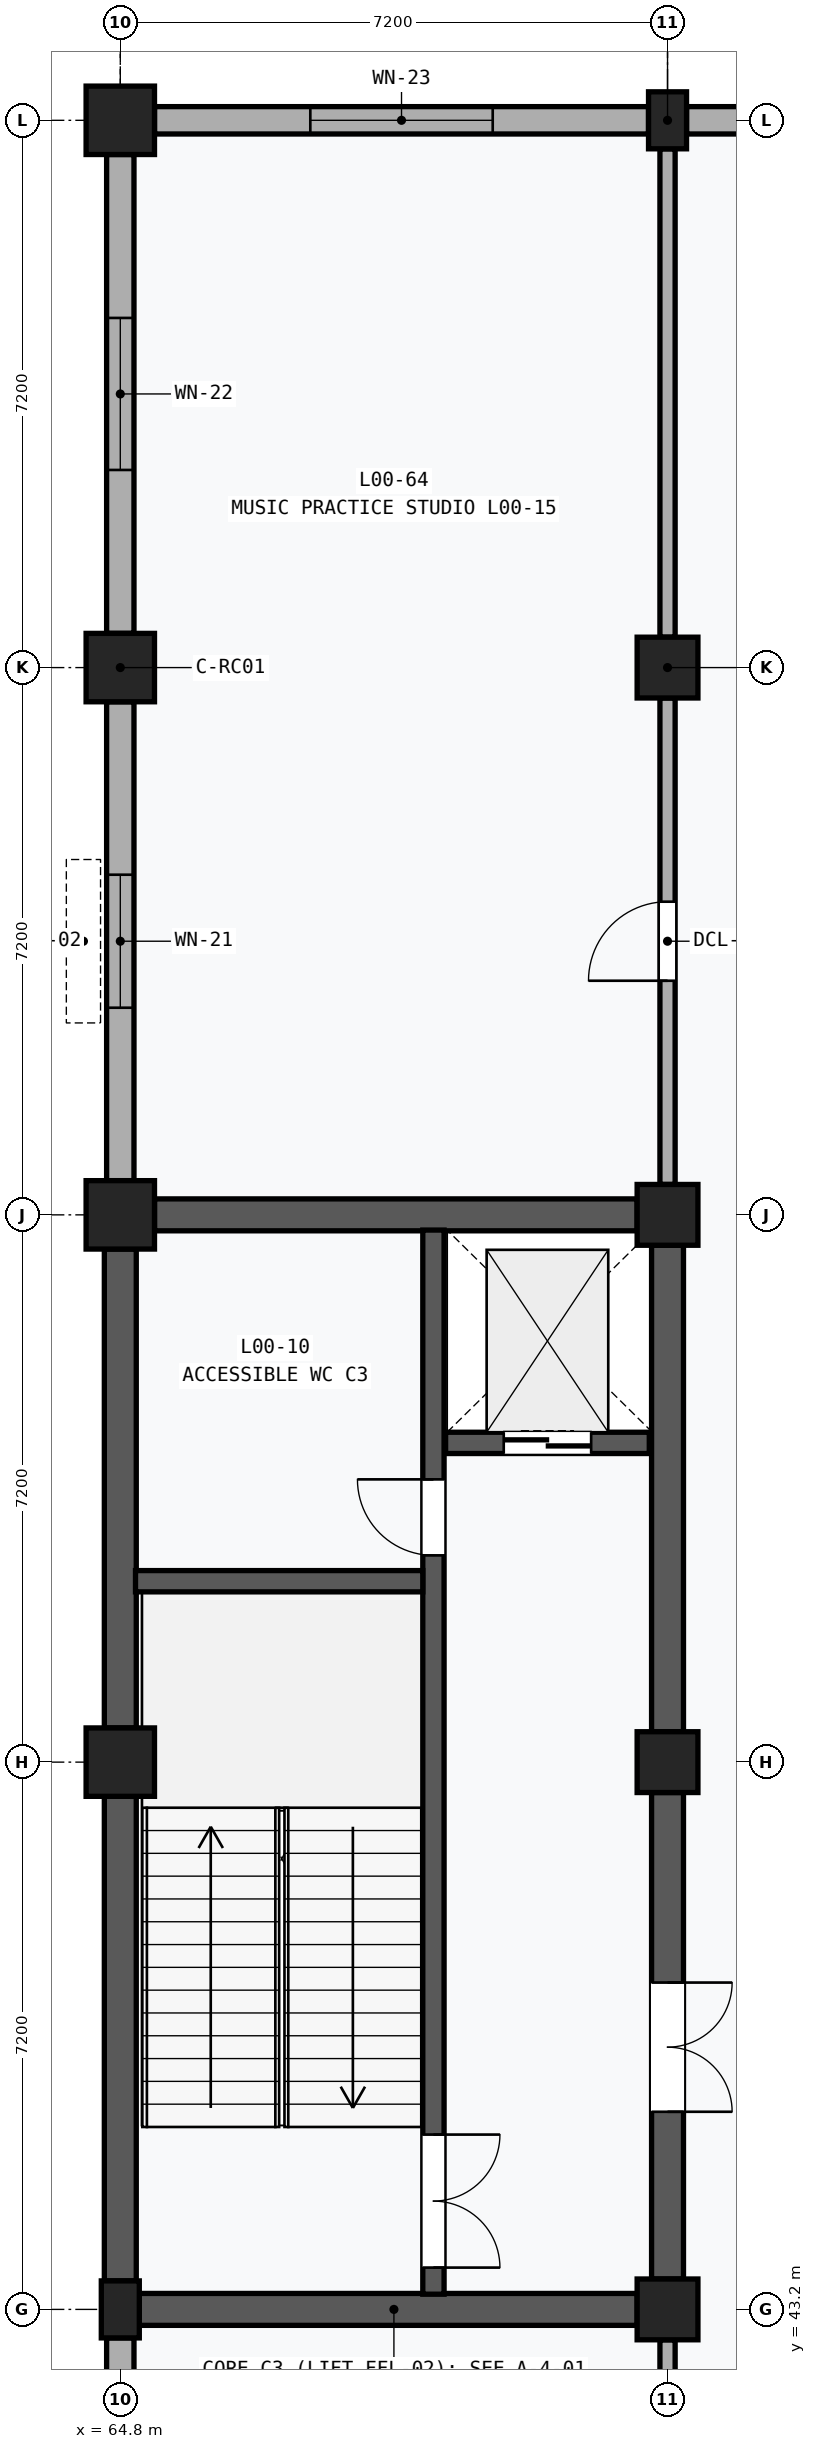
"""IFC4 building model, lengths in metres.
Left out: names, types, materials, properties, quantities, classifications, styles, units other than length and angle.
Written with IfcOpenShell. Run it as: python <this file> out.ifc"""

import sys

from ifc_helpers import new_model, si_unit, direction, frame, frame_2d, origin, origin_2d, place, context, subcontext, project, spatial, rectangle, extrude, element, fill, save


model = new_model("IFC4")
c1 = context("Model", 3, precision=1e-05, world=origin(), true_north=direction((0.0, 1.0)))
c2 = subcontext(c1, "Body", "Model", "MODEL_VIEW")
j1 = project(units=[si_unit("LENGTHUNIT", "METRE"), si_unit("PLANEANGLEUNIT", "RADIAN")], contexts=[c1])
p1 = place(None, origin())
s1 = spatial("IfcSite", under=j1, at=p1, CompositionType="ELEMENT")
p2 = place(p1, origin())
s2 = spatial("IfcBuilding", under=s1, at=p2, CompositionType="ELEMENT")
p3 = place(p2, origin())
s3 = spatial("IfcBuildingStorey", under=s2, at=p3, CompositionType="ELEMENT", Elevation=0.0)
p4 = place(p3, frame((64.8, 43.2, 0.0), z_axis=(0.0, 0.0, 1.0), x_axis=(1.0, 0.0, 0.0)))
e1 = element("IfcColumn", 1, at=p4, inside=s3, PredefinedType="PILASTER", context=c2, shape_type="SweptSolid", body=[
    extrude(rectangle(XDim=0.5, YDim=0.75, at=origin_2d()), origin(), (0.0, 0.0, 1.0), 4.8),
])
for number, where, z_axis, x_axis in (
    (2, (64.8, 50.4, 0.0), (0.0, 0.0, 1.0), (1.0, 0.0, 0.0)),
    (3, (64.8, 57.6, 0.0), (0.0, 0.0, 1.0), (1.0, 0.0, 0.0)),
    (4, (64.8, 64.8, 0.0), (0.0, 0.0, 1.0), (1.0, 0.0, 0.0)),
    (5, (64.8, 72.0, 0.0), (0.0, 0.0, 1.0), (1.0, 0.0, 0.0)),
):
    element("IfcColumn", number, at=place(p3, frame(where, z_axis=z_axis, x_axis=x_axis)), inside=s3, PredefinedType="COLUMN", context=c2, shape_type="SweptSolid", body=[
        extrude(rectangle(XDim=0.9, YDim=0.9, at=origin_2d()), origin(), (0.0, 0.0, 1.0), 4.8),
    ])
for number, where, z_axis, x_axis in (
    (6, (72.0, 43.2, 0.0), (0.0, 0.0, 1.0), (1.0, 0.0, 0.0)),
    (7, (72.0, 50.4, 0.0), (0.0, 0.0, 1.0), (1.0, 0.0, 0.0)),
    (8, (72.0, 57.6, 0.0), (0.0, 0.0, 1.0), (1.0, 0.0, 0.0)),
    (9, (72.0, 64.8, 0.0), (0.0, 0.0, 1.0), (1.0, 0.0, 0.0)),
):
    element("IfcColumn", number, at=place(p3, frame(where, z_axis=z_axis, x_axis=x_axis)), inside=s3, PredefinedType="COLUMN", context=c2, shape_type="SweptSolid", body=[
        extrude(rectangle(XDim=0.8, YDim=0.8, at=origin_2d()), origin(), (0.0, 0.0, 1.0), 4.8),
    ])
p5 = place(p3, frame((72.0, 72.0, 0.0), z_axis=(0.0, 0.0, 1.0), x_axis=(1.0, 0.0, 0.0)))
e10 = element("IfcColumn", 10, at=p5, inside=s3, PredefinedType="PILASTER", context=c2, shape_type="SweptSolid", body=[
    extrude(rectangle(XDim=0.5, YDim=0.75, at=origin_2d()), origin(), (0.0, 0.0, 1.0), 4.8),
])
p6 = place(p3, frame((64.8, 36.45, 0.0), z_axis=(0.0, 0.0, 1.0), x_axis=(0.0, 1.0, 0.0)))
e11 = element("IfcWall", 11, at=p6, inside=s3, PredefinedType="SOLIDWALL", context=c2, shape_type="SweptSolid", body=[
    extrude(rectangle(XDim=6.375, YDim=0.36, at=frame_2d((3.188, 0.0))), origin(), (0.0, 0.0, 1.0), 3.89),
])
p7 = place(p6, frame((2.087, 0.0, 1.1)))
e12 = element("IfcOpeningElement", 12, at=p7, cuts=e11, PredefinedType="OPENING", context=c2, shape_type="SweptSolid", body=[
    extrude(rectangle(XDim=2.2, YDim=1.5, at=frame_2d((1.1, 0.75))), frame((0.0, 0.192, 0.0), z_axis=(0.0, -1.0, 0.0), x_axis=(1.0, 0.0, 0.0)), (0.0, 0.0, 1.0), 0.384),
])
p8 = place(p3, frame((64.8, 58.05, 0.0), z_axis=(0.0, 0.0, 1.0), x_axis=(0.0, 1.0, 0.0)))
e13 = element("IfcWall", 13, at=p8, inside=s3, PredefinedType="SOLIDWALL", context=c2, shape_type="SweptSolid", body=[
    extrude(rectangle(XDim=6.3, YDim=0.36, at=frame_2d((3.15, 0.0))), origin(), (0.0, 0.0, 1.0), 3.89),
])
p9 = place(p8, frame((2.275, 0.0, 1.2)))
e14 = element("IfcOpeningElement", 14, at=p9, cuts=e13, PredefinedType="OPENING", context=c2, shape_type="SweptSolid", body=[
    extrude(rectangle(XDim=1.75, YDim=1.35, at=frame_2d((0.875, 0.675))), frame((0.0, 0.192, 0.0), z_axis=(0.0, -1.0, 0.0), x_axis=(1.0, 0.0, 0.0)), (0.0, 0.0, 1.0), 0.384),
])
p10 = place(p3, frame((65.25, 72.0, 0.0), z_axis=(0.0, 0.0, 1.0), x_axis=(1.0, 0.0, 0.0)))
e15 = element("IfcWall", 15, at=p10, inside=s3, PredefinedType="SOLIDWALL", context=c2, shape_type="SweptSolid", body=[
    extrude(rectangle(XDim=6.5, YDim=0.36, at=frame_2d((3.25, 0.0))), origin(), (0.0, 0.0, 1.0), 3.89),
])
p11 = place(p10, frame((2.05, 0.0, 0.7)))
e16 = element("IfcOpeningElement", 16, at=p11, cuts=e15, PredefinedType="OPENING", context=c2, shape_type="SweptSolid", body=[
    extrude(rectangle(XDim=2.4, YDim=2.2, at=frame_2d((1.2, 1.1))), frame((0.0, 0.192, 0.0), z_axis=(0.0, -1.0, 0.0), x_axis=(1.0, 0.0, 0.0)), (0.0, 0.0, 1.0), 0.384),
])
p12 = place(p3, frame((64.8, 65.25, 0.0), z_axis=(0.0, 0.0, 1.0), x_axis=(0.0, 1.0, 0.0)))
e17 = element("IfcWall", 17, at=p12, inside=s3, PredefinedType="SOLIDWALL", context=c2, shape_type="SweptSolid", body=[
    extrude(rectangle(XDim=6.3, YDim=0.36, at=frame_2d((3.15, 0.0))), origin(), (0.0, 0.0, 1.0), 3.89),
])
p13 = place(p12, frame((2.15, 0.0, 0.7)))
e18 = element("IfcOpeningElement", 18, at=p13, cuts=e17, PredefinedType="OPENING", context=c2, shape_type="SweptSolid", body=[
    extrude(rectangle(XDim=2.0, YDim=2.2, at=frame_2d((1.0, 1.1))), frame((0.0, 0.192, 0.0), z_axis=(0.0, -1.0, 0.0), x_axis=(1.0, 0.0, 0.0)), (0.0, 0.0, 1.0), 0.384),
])
p14 = place(p3, frame((72.25, 72.0, 0.0), z_axis=(0.0, 0.0, 1.0), x_axis=(1.0, 0.0, 0.0)))
e19 = element("IfcWall", 19, at=p14, inside=s3, PredefinedType="SOLIDWALL", context=c2, shape_type="SweptSolid", body=[
    extrude(rectangle(XDim=6.55, YDim=0.36, at=frame_2d((3.275, 0.0))), origin(), (0.0, 0.0, 1.0), 3.89),
])
p15 = place(p14, frame((1.875, 0.0, 0.7)))
e20 = element("IfcOpeningElement", 20, at=p15, cuts=e19, PredefinedType="OPENING", context=c2, shape_type="SweptSolid", body=[
    extrude(rectangle(XDim=2.8, YDim=2.2, at=frame_2d((1.4, 1.1))), frame((0.0, 0.192, 0.0), z_axis=(0.0, -1.0, 0.0), x_axis=(1.0, 0.0, 0.0)), (0.0, 0.0, 1.0), 0.384),
])
p16 = place(p3, frame((64.8, 43.575, 0.0), z_axis=(0.0, 0.0, 1.0), x_axis=(0.0, 1.0, 0.0)))
e21 = element("IfcWall", 21, at=p16, inside=s3, PredefinedType="SHEAR", context=c2, shape_type="SweptSolid", body=[
    extrude(rectangle(XDim=6.375, YDim=0.42, at=frame_2d((3.188, 0.0))), origin(), (0.0, 0.0, 1.0), 3.89),
])
p17 = place(p3, frame((64.8, 50.85, 0.0), z_axis=(0.0, 0.0, 1.0), x_axis=(0.0, 1.0, 0.0)))
e22 = element("IfcWall", 22, at=p17, inside=s3, PredefinedType="SHEAR", context=c2, shape_type="SweptSolid", body=[
    extrude(rectangle(XDim=6.3, YDim=0.42, at=frame_2d((3.15, 0.0))), origin(), (0.0, 0.0, 1.0), 3.89),
])
p18 = place(p3, frame((72.0, 43.6, 0.0), z_axis=(0.0, 0.0, 1.0), x_axis=(0.0, 1.0, 0.0)))
e23 = element("IfcWall", 23, at=p18, inside=s3, PredefinedType="SHEAR", context=c2, shape_type="SweptSolid", body=[
    extrude(rectangle(XDim=6.4, YDim=0.42, at=frame_2d((3.2, 0.0))), origin(), (0.0, 0.0, 1.0), 3.62),
])
p19 = place(p18, frame((2.2, 0.0, 0.0)))
e24 = element("IfcOpeningElement", 24, at=p19, cuts=e23, PredefinedType="OPENING", context=c2, shape_type="SweptSolid", body=[
    extrude(rectangle(XDim=1.7, YDim=2.25, at=frame_2d((0.85, 1.125))), frame((0.0, 0.222, 0.0), z_axis=(0.0, -1.0, 0.0), x_axis=(1.0, 0.0, 0.0)), (0.0, 0.0, 1.0), 0.444),
])
p20 = place(p3, frame((72.0, 50.8, 0.0), z_axis=(0.0, 0.0, 1.0), x_axis=(0.0, 1.0, 0.0)))
e25 = element("IfcWall", 25, at=p20, inside=s3, PredefinedType="SHEAR", context=c2, shape_type="SweptSolid", body=[
    extrude(rectangle(XDim=6.4, YDim=0.42, at=frame_2d((3.2, 0.0))), origin(), (0.0, 0.0, 1.0), 3.62),
])
p21 = place(p3, frame((65.05, 43.2, 0.0), z_axis=(0.0, 0.0, 1.0), x_axis=(1.0, 0.0, 0.0)))
e26 = element("IfcWall", 26, at=p21, inside=s3, PredefinedType="SHEAR", context=c2, shape_type="SweptSolid", body=[
    extrude(rectangle(XDim=6.55, YDim=0.42, at=frame_2d((3.275, 0.0))), origin(), (0.0, 0.0, 1.0), 3.62),
])
p22 = place(p3, frame((65.25, 57.6, 0.0), z_axis=(0.0, 0.0, 1.0), x_axis=(1.0, 0.0, 0.0)))
e27 = element("IfcWall", 27, at=p22, inside=s3, PredefinedType="SHEAR", context=c2, shape_type="SweptSolid", body=[
    extrude(rectangle(XDim=6.35, YDim=0.42, at=frame_2d((3.175, 0.0))), origin(), (0.0, 0.0, 1.0), 3.62),
])
p23 = place(p3, frame((68.92, 43.4, 0.0), z_axis=(0.0, 0.0, 1.0), x_axis=(0.0, 1.0, 0.0)))
e28 = element("IfcWall", 28, at=p23, inside=s3, PredefinedType="SHEAR", context=c2, shape_type="SweptSolid", body=[
    extrude(rectangle(XDim=14.0, YDim=0.28, at=frame_2d((7.0, 0.0))), origin(), (0.0, 0.0, 1.0), 4.52),
])
p24 = place(p23, frame((0.35, 0.0, 0.0)))
e29 = element("IfcOpeningElement", 29, at=p24, cuts=e28, PredefinedType="OPENING", context=c2, shape_type="SweptSolid", body=[
    extrude(rectangle(XDim=1.75, YDim=2.15, at=frame_2d((0.875, 1.075))), frame((0.0, 0.152, 0.0), z_axis=(0.0, -1.0, 0.0), x_axis=(1.0, 0.0, 0.0)), (0.0, 0.0, 1.0), 0.304),
])
p25 = place(p23, frame((9.72, 0.0, 0.0)))
e30 = element("IfcOpeningElement", 30, at=p25, cuts=e28, PredefinedType="OPENING", context=c2, shape_type="SweptSolid", body=[
    extrude(rectangle(XDim=1.0, YDim=2.15, at=frame_2d((0.5, 1.075))), frame((0.0, 0.152, 0.0), z_axis=(0.0, -1.0, 0.0), x_axis=(1.0, 0.0, 0.0)), (0.0, 0.0, 1.0), 0.304),
])
p26 = place(p3, frame((65.0, 52.78, 0.0), z_axis=(0.0, 0.0, 1.0), x_axis=(1.0, 0.0, 0.0)))
e31 = element("IfcWall", 31, at=p26, inside=s3, PredefinedType="SHEAR", context=c2, shape_type="SweptSolid", body=[
    extrude(rectangle(XDim=3.78, YDim=0.28, at=frame_2d((1.89, 0.0))), origin(), (0.0, 0.0, 1.0), 4.52),
])
p27 = place(p3, frame((69.08, 54.6, 0.0), z_axis=(0.0, 0.0, 1.0), x_axis=(1.0, 0.0, 0.0)))
e32 = element("IfcWall", 32, at=p27, inside=s3, PredefinedType="SHEAR", context=c2, shape_type="SweptSolid", body=[
    extrude(rectangle(XDim=2.68, YDim=0.28, at=frame_2d((1.34, 0.0))), origin(), (0.0, 0.0, 1.0), 4.52),
])
p28 = place(p27, frame((0.765, 0.0, 0.0)))
e33 = element("IfcOpeningElement", 33, at=p28, cuts=e32, PredefinedType="OPENING", context=c2, shape_type="SweptSolid", body=[
    extrude(rectangle(XDim=1.15, YDim=2.2, at=frame_2d((0.575, 1.1))), frame((0.0, 0.152, 0.0), z_axis=(0.0, -1.0, 0.0), x_axis=(1.0, 0.0, 0.0)), (0.0, 0.0, 1.0), 0.304),
])
p29 = place(p3, frame((72.0, 36.4, 0.0), z_axis=(0.0, 0.0, 1.0), x_axis=(0.0, 1.0, 0.0)))
e34 = element("IfcWall", 34, at=p29, inside=s3, PredefinedType="PARTITIONING", context=c2, shape_type="SweptSolid", body=[
    extrude(rectangle(XDim=6.4, YDim=0.2, at=frame_2d((3.2, 0.0))), origin(), (0.0, 0.0, 1.0), 3.62),
])
p30 = place(p3, frame((72.0, 58.0, 0.0), z_axis=(0.0, 0.0, 1.0), x_axis=(0.0, 1.0, 0.0)))
e35 = element("IfcWall", 35, at=p30, inside=s3, PredefinedType="PARTITIONING", context=c2, shape_type="SweptSolid", body=[
    extrude(rectangle(XDim=6.4, YDim=0.2, at=frame_2d((3.2, 0.0))), origin(), (0.0, 0.0, 1.0), 3.62),
])
p31 = place(p30, frame((2.68, 0.0, 0.0)))
e36 = element("IfcOpeningElement", 36, at=p31, cuts=e35, PredefinedType="OPENING", context=c2, shape_type="SweptSolid", body=[
    extrude(rectangle(XDim=1.04, YDim=2.14, at=frame_2d((0.52, 1.07))), frame((0.0, 0.112, 0.0), z_axis=(0.0, -1.0, 0.0), x_axis=(1.0, 0.0, 0.0)), (0.0, 0.0, 1.0), 0.224),
])
p32 = place(p3, frame((72.0, 65.2, 0.0), z_axis=(0.0, 0.0, 1.0), x_axis=(0.0, 1.0, 0.0)))
e37 = element("IfcWall", 37, at=p32, inside=s3, PredefinedType="PARTITIONING", context=c2, shape_type="SweptSolid", body=[
    extrude(rectangle(XDim=6.425, YDim=0.2, at=frame_2d((3.212, 0.0))), origin(), (0.0, 0.0, 1.0), 3.62),
])
p33 = place(p9, origin())
e38 = element("IfcWindow", 38, at=p33, inside=s3, PartitioningType="SINGLE_PANEL", PredefinedType="WINDOW", context=c2, shape_type="SweptSolid", body=[
    extrude(rectangle(XDim=1.75, YDim=1.35, at=frame_2d((0.875, 0.675))), frame((0.0, 0.03, 0.0), z_axis=(0.0, -1.0, 0.0), x_axis=(1.0, 0.0, 0.0)), (0.0, 0.0, 1.0), 0.06),
])
fill(e14, e38)
p34 = place(p11, origin())
e39 = element("IfcWindow", 39, at=p34, inside=s3, PartitioningType="SINGLE_PANEL", PredefinedType="WINDOW", context=c2, shape_type="SweptSolid", body=[
    extrude(rectangle(XDim=2.4, YDim=2.2, at=frame_2d((1.2, 1.1))), frame((0.0, 0.03, 0.0), z_axis=(0.0, -1.0, 0.0), x_axis=(1.0, 0.0, 0.0)), (0.0, 0.0, 1.0), 0.06),
])
fill(e16, e39)
p35 = place(p13, origin())
e40 = element("IfcWindow", 40, at=p35, inside=s3, PartitioningType="SINGLE_PANEL", PredefinedType="WINDOW", context=c2, shape_type="SweptSolid", body=[
    extrude(rectangle(XDim=2.0, YDim=2.2, at=frame_2d((1.0, 1.1))), frame((0.0, 0.03, 0.0), z_axis=(0.0, -1.0, 0.0), x_axis=(1.0, 0.0, 0.0)), (0.0, 0.0, 1.0), 0.06),
])
fill(e18, e40)
p36 = place(p19, frame((1.7, 0.0, 0.0), z_axis=(0.0, 0.0, 1.0), x_axis=(-1.0, 0.0, 0.0)))
e41 = element("IfcDoor", 41, at=p36, inside=s3, OperationType="DOUBLE_DOOR_SINGLE_SWING", PredefinedType="DOOR", context=c2, shape_type="SweptSolid", body=[
    extrude(rectangle(XDim=1.7, YDim=2.25, at=frame_2d((0.85, 1.125))), frame((0.0, 0.025, 0.0), z_axis=(0.0, -1.0, 0.0), x_axis=(1.0, 0.0, 0.0)), (0.0, 0.0, 1.0), 0.05),
])
fill(e24, e41)
p37 = place(p24, frame((1.75, 0.0, 0.0), z_axis=(0.0, 0.0, 1.0), x_axis=(-1.0, 0.0, 0.0)))
e42 = element("IfcDoor", 42, at=p37, inside=s3, OperationType="DOUBLE_DOOR_SINGLE_SWING", PredefinedType="DOOR", context=c2, shape_type="SweptSolid", body=[
    extrude(rectangle(XDim=1.75, YDim=2.15, at=frame_2d((0.875, 1.075))), frame((0.0, 0.025, 0.0), z_axis=(0.0, -1.0, 0.0), x_axis=(1.0, 0.0, 0.0)), (0.0, 0.0, 1.0), 0.05),
])
fill(e29, e42)
p38 = place(p25, origin())
e43 = element("IfcDoor", 43, at=p38, inside=s3, OperationType="SINGLE_SWING_RIGHT", PredefinedType="DOOR", context=c2, shape_type="SweptSolid", body=[
    extrude(rectangle(XDim=1.0, YDim=2.15, at=frame_2d((0.5, 1.075))), frame((0.0, 0.025, 0.0), z_axis=(0.0, -1.0, 0.0), x_axis=(1.0, 0.0, 0.0)), (0.0, 0.0, 1.0), 0.05),
])
fill(e30, e43)
p39 = place(p28, frame((1.15, 0.0, 0.0), z_axis=(0.0, 0.0, 1.0), x_axis=(-1.0, 0.0, 0.0)))
e44 = element("IfcDoor", 44, at=p39, inside=s3, OperationType="DOUBLE_DOOR_SLIDING", PredefinedType="DOOR", context=c2, shape_type="SweptSolid", body=[
    extrude(rectangle(XDim=1.15, YDim=2.2, at=frame_2d((0.575, 1.1))), frame((0.0, 0.025, 0.0), z_axis=(0.0, -1.0, 0.0), x_axis=(1.0, 0.0, 0.0)), (0.0, 0.0, 1.0), 0.05),
])
fill(e33, e44)
p40 = place(p31, origin())
e45 = element("IfcDoor", 45, at=p40, inside=s3, OperationType="SINGLE_SWING_LEFT", PredefinedType="DOOR", context=c2, shape_type="SweptSolid", body=[
    extrude(rectangle(XDim=1.04, YDim=2.14, at=frame_2d((0.52, 1.07))), frame((0.0, 0.025, 0.0), z_axis=(0.0, -1.0, 0.0), x_axis=(1.0, 0.0, 0.0)), (0.0, 0.0, 1.0), 0.05),
])
fill(e36, e45)
save(model, sys.argv[1])
